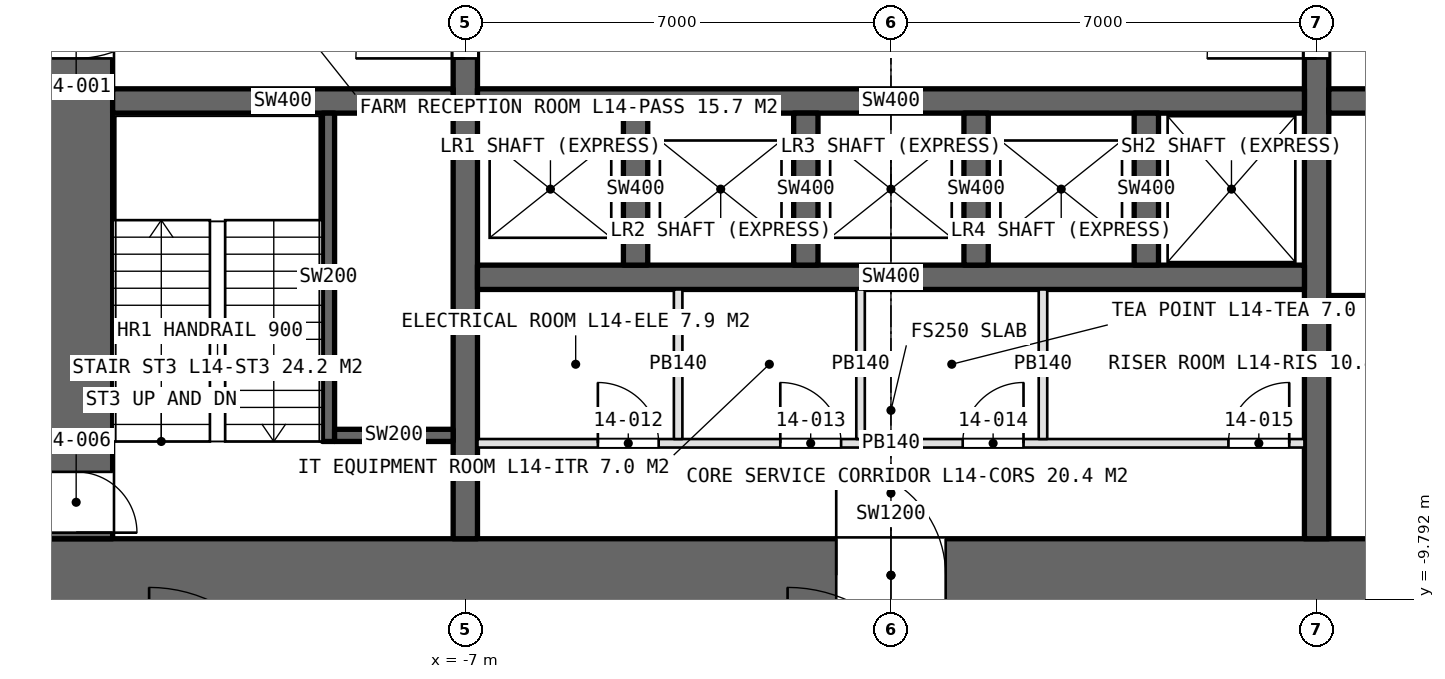
"""IFC4 building model, lengths in metres.
Left out: names, types, materials, properties, quantities, classifications, styles, units other than length and angle.
Written with IfcOpenShell. Run it as: python <this file> out.ifc"""

import sys

from ifc_helpers import new_model, si_unit, direction, frame, frame_2d, origin, place, context, subcontext, project, spatial, rectangle, extrude, element, fill, save


model = new_model("IFC4")
c1 = context("Model", 3, precision=1e-05, world=origin(), true_north=direction((0.0, 1.0)))
c2 = subcontext(c1, "Body", "Model", "MODEL_VIEW")
j1 = project(units=[si_unit("LENGTHUNIT", "METRE"), si_unit("PLANEANGLEUNIT", "RADIAN")], contexts=[c1])
p1 = place(None, origin())
s1 = spatial("IfcSite", under=j1, at=p1, CompositionType="ELEMENT")
p2 = place(p1, origin())
s2 = spatial("IfcBuilding", under=s1, at=p2, CompositionType="ELEMENT")
p3 = place(p2, frame((0.0, 0.0, 70.0)))
s3 = spatial("IfcBuildingStorey", under=s2, at=p3, CompositionType="ELEMENT", Elevation=70.0)
p4 = place(p3, frame((-14.0, -9.4, 0.0), z_axis=(0.0, 0.0, 1.0), x_axis=(1.0, 0.0, 0.0)))
e1 = element("IfcWall", 1, at=p4, inside=s3, PredefinedType="SHEAR", context=c2, shape_type="SweptSolid", body=[
    extrude(rectangle(XDim=28.0, YDim=1.2, at=frame_2d((14.0, 0.0))), origin(), (0.0, 0.0, 1.0), 5.0),
])
p5 = place(p4, frame((13.1, 0.0, 0.0)))
e2 = element("IfcOpeningElement", 2, at=p5, cuts=e1, PredefinedType="OPENING", context=c2, shape_type="SweptSolid", body=[
    extrude(rectangle(XDim=1.8, YDim=2.4, at=frame_2d((0.9, 1.2))), frame((0.0, 0.61, 0.0), z_axis=(0.0, -1.0, 0.0), x_axis=(1.0, 0.0, 0.0)), (0.0, 0.0, 1.0), 1.22),
])
p6 = place(p4, frame((22.9, 0.0, 0.0)))
e3 = element("IfcOpeningElement", 3, at=p6, cuts=e1, PredefinedType="OPENING", context=c2, shape_type="SweptSolid", body=[
    extrude(rectangle(XDim=2.2, YDim=2.7, at=frame_2d((1.1, 1.35))), frame((0.0, 0.61, 0.0), z_axis=(0.0, -1.0, 0.0), x_axis=(1.0, 0.0, 0.0)), (0.0, 0.0, 1.0), 1.22),
])
p7 = place(p3, frame((-13.4, 8.8, 0.0), z_axis=(0.0, 0.0, 1.0), x_axis=(0.0, -1.0, 0.0)))
e4 = element("IfcWall", 4, at=p7, inside=s3, PredefinedType="SHEAR", context=c2, shape_type="SweptSolid", body=[
    extrude(rectangle(XDim=17.6, YDim=1.2, at=frame_2d((8.8, 0.0))), origin(), (0.0, 0.0, 1.0), 5.0),
])
p8 = place(p7, frame((7.9, 0.0, 0.0)))
e5 = element("IfcOpeningElement", 5, at=p8, cuts=e4, PredefinedType="OPENING", context=c2, shape_type="SweptSolid", body=[
    extrude(rectangle(XDim=1.8, YDim=2.4, at=frame_2d((0.9, 1.2))), frame((0.0, 0.61, 0.0), z_axis=(0.0, -1.0, 0.0), x_axis=(1.0, 0.0, 0.0)), (0.0, 0.0, 1.0), 1.22),
])
p9 = place(p7, frame((16.5, 0.0, 0.0)))
e6 = element("IfcOpeningElement", 6, at=p9, cuts=e4, PredefinedType="OPENING", context=c2, shape_type="SweptSolid", body=[
    extrude(rectangle(XDim=1.0, YDim=2.4, at=frame_2d((0.5, 1.2))), frame((0.0, 0.61, 0.0), z_axis=(0.0, -1.0, 0.0), x_axis=(1.0, 0.0, 0.0)), (0.0, 0.0, 1.0), 1.22),
])
p10 = place(p3, frame((-7.0, -8.8, 0.0), z_axis=(0.0, 0.0, 1.0), x_axis=(0.0, 1.0, 0.0)))
e7 = element("IfcWall", 7, at=p10, inside=s3, PredefinedType="SHEAR", context=c2, shape_type="SweptSolid", body=[
    extrude(rectangle(XDim=17.6, YDim=0.4, at=frame_2d((8.8, 0.0))), origin(), (0.0, 0.0, 1.0), 5.0),
])
p11 = place(p10, frame((7.9, 0.0, 0.0)))
e8 = element("IfcOpeningElement", 8, at=p11, cuts=e7, PredefinedType="OPENING", context=c2, shape_type="SweptSolid", body=[
    extrude(rectangle(XDim=1.8, YDim=2.4, at=frame_2d((0.9, 1.2))), frame((0.0, 0.21, 0.0), z_axis=(0.0, -1.0, 0.0), x_axis=(1.0, 0.0, 0.0)), (0.0, 0.0, 1.0), 0.42),
])
p12 = place(p3, frame((7.0, -8.8, 0.0), z_axis=(0.0, 0.0, 1.0), x_axis=(0.0, 1.0, 0.0)))
e9 = element("IfcWall", 9, at=p12, inside=s3, PredefinedType="SHEAR", context=c2, shape_type="SweptSolid", body=[
    extrude(rectangle(XDim=17.6, YDim=0.4, at=frame_2d((8.8, 0.0))), origin(), (0.0, 0.0, 1.0), 5.0),
])
p13 = place(p12, frame((7.9, 0.0, 0.0)))
e10 = element("IfcOpeningElement", 10, at=p13, cuts=e9, PredefinedType="OPENING", context=c2, shape_type="SweptSolid", body=[
    extrude(rectangle(XDim=1.8, YDim=2.4, at=frame_2d((0.9, 1.2))), frame((0.0, 0.21, 0.0), z_axis=(0.0, -1.0, 0.0), x_axis=(1.0, 0.0, 0.0)), (0.0, 0.0, 1.0), 0.42),
])
for number, where, z_axis, x_axis in (
    (11, (-6.8, -1.6, 0.0), (0.0, 0.0, 1.0), (1.0, 0.0, 0.0)),
    (12, (-6.8, -4.5, 0.0), (0.0, 0.0, 1.0), (1.0, 0.0, 0.0)),
):
    element("IfcWall", number, at=place(p3, frame(where, z_axis=z_axis, x_axis=x_axis)), inside=s3, PredefinedType="SHEAR", context=c2, shape_type="SweptSolid", body=[
        extrude(rectangle(XDim=13.6, YDim=0.4, at=frame_2d((6.8, 0.0))), origin(), (0.0, 0.0, 1.0), 5.0),
    ])
p14 = place(p3, frame((-12.8, -1.6, 0.0), z_axis=(0.0, 0.0, 1.0), x_axis=(1.0, 0.0, 0.0)))
e13 = element("IfcWall", 13, at=p14, inside=s3, PredefinedType="SHEAR", context=c2, shape_type="SweptSolid", body=[
    extrude(rectangle(XDim=5.6, YDim=0.4, at=frame_2d((2.8, 0.0))), origin(), (0.0, 0.0, 1.0), 5.0),
])
p15 = place(p3, frame((7.2, -1.6, 0.0), z_axis=(0.0, 0.0, 1.0), x_axis=(1.0, 0.0, 0.0)))
e14 = element("IfcWall", 14, at=p15, inside=s3, PredefinedType="SHEAR", context=c2, shape_type="SweptSolid", body=[
    extrude(rectangle(XDim=5.6, YDim=0.4, at=frame_2d((2.8, 0.0))), origin(), (0.0, 0.0, 1.0), 5.0),
])
p16 = place(p15, frame((0.9, 0.0, 0.0)))
e15 = element("IfcOpeningElement", 15, at=p16, cuts=e14, PredefinedType="OPENING", context=c2, shape_type="SweptSolid", body=[
    extrude(rectangle(XDim=1.3, YDim=2.4, at=frame_2d((0.65, 1.2))), frame((0.0, 0.21, 0.0), z_axis=(0.0, -1.0, 0.0), x_axis=(1.0, 0.0, 0.0)), (0.0, 0.0, 1.0), 0.42),
])
p17 = place(p15, frame((3.9, 0.0, 0.0)))
e16 = element("IfcOpeningElement", 16, at=p17, cuts=e14, PredefinedType="OPENING", context=c2, shape_type="SweptSolid", body=[
    extrude(rectangle(XDim=1.3, YDim=2.4, at=frame_2d((0.65, 1.2))), frame((0.0, 0.21, 0.0), z_axis=(0.0, -1.0, 0.0), x_axis=(1.0, 0.0, 0.0)), (0.0, 0.0, 1.0), 0.42),
])
p18 = place(p3, frame((7.2, -5.0, 0.0), z_axis=(0.0, 0.0, 1.0), x_axis=(1.0, 0.0, 0.0)))
e17 = element("IfcWall", 17, at=p18, inside=s3, PredefinedType="SHEAR", context=c2, shape_type="SweptSolid", body=[
    extrude(rectangle(XDim=5.6, YDim=0.4, at=frame_2d((2.8, 0.0))), origin(), (0.0, 0.0, 1.0), 5.0),
])
for number, where, z_axis, x_axis in (
    (18, (-4.2, -4.3, 0.0), (0.0, 0.0, 1.0), (0.0, 1.0, 0.0)),
    (19, (-1.4, -4.3, 0.0), (0.0, 0.0, 1.0), (0.0, 1.0, 0.0)),
    (20, (1.4, -4.3, 0.0), (0.0, 0.0, 1.0), (0.0, 1.0, 0.0)),
    (21, (4.2, -4.3, 0.0), (0.0, 0.0, 1.0), (0.0, 1.0, 0.0)),
):
    element("IfcWall", number, at=place(p3, frame(where, z_axis=z_axis, x_axis=x_axis)), inside=s3, PredefinedType="SHEAR", context=c2, shape_type="SweptSolid", body=[
        extrude(rectangle(XDim=2.5, YDim=0.4, at=frame_2d((1.25, 0.0))), origin(), (0.0, 0.0, 1.0), 5.0),
    ])
p19 = place(p3, frame((-6.8, -7.23, 0.0), z_axis=(0.0, 0.0, 1.0), x_axis=(1.0, 0.0, 0.0)))
e22 = element("IfcWall", 22, at=p19, inside=s3, PredefinedType="PARTITIONING", context=c2, shape_type="SweptSolid", body=[
    extrude(rectangle(XDim=13.6, YDim=0.14, at=frame_2d((6.8, 0.0))), origin(), (0.0, 0.0, 1.0), 4.75),
])
p20 = place(p19, frame((1.98, 0.0, 0.0)))
e23 = element("IfcOpeningElement", 23, at=p20, cuts=e22, PredefinedType="OPENING", context=c2, shape_type="SweptSolid", body=[
    extrude(rectangle(XDim=1.0, YDim=2.4, at=frame_2d((0.5, 1.2))), frame((0.0, 0.08, 0.0), z_axis=(0.0, -1.0, 0.0), x_axis=(1.0, 0.0, 0.0)), (0.0, 0.0, 1.0), 0.16),
])
p21 = place(p19, frame((4.98, 0.0, 0.0)))
e24 = element("IfcOpeningElement", 24, at=p21, cuts=e22, PredefinedType="OPENING", context=c2, shape_type="SweptSolid", body=[
    extrude(rectangle(XDim=1.0, YDim=2.4, at=frame_2d((0.5, 1.2))), frame((0.0, 0.08, 0.0), z_axis=(0.0, -1.0, 0.0), x_axis=(1.0, 0.0, 0.0)), (0.0, 0.0, 1.0), 0.16),
])
p22 = place(p19, frame((7.98, 0.0, 0.0)))
e25 = element("IfcOpeningElement", 25, at=p22, cuts=e22, PredefinedType="OPENING", context=c2, shape_type="SweptSolid", body=[
    extrude(rectangle(XDim=1.0, YDim=2.4, at=frame_2d((0.5, 1.2))), frame((0.0, 0.08, 0.0), z_axis=(0.0, -1.0, 0.0), x_axis=(1.0, 0.0, 0.0)), (0.0, 0.0, 1.0), 0.16),
])
p23 = place(p19, frame((12.35, 0.0, 0.0)))
e26 = element("IfcOpeningElement", 26, at=p23, cuts=e22, PredefinedType="OPENING", context=c2, shape_type="SweptSolid", body=[
    extrude(rectangle(XDim=1.0, YDim=2.4, at=frame_2d((0.5, 1.2))), frame((0.0, 0.08, 0.0), z_axis=(0.0, -1.0, 0.0), x_axis=(1.0, 0.0, 0.0)), (0.0, 0.0, 1.0), 0.16),
])
for number, where, z_axis, x_axis in (
    (27, (-3.5, -4.7, 0.0), (0.0, 0.0, 1.0), (0.0, -1.0, 0.0)),
    (28, (-0.5, -4.7, 0.0), (0.0, 0.0, 1.0), (0.0, -1.0, 0.0)),
    (29, (2.5, -4.7, 0.0), (0.0, 0.0, 1.0), (0.0, -1.0, 0.0)),
):
    element("IfcWall", number, at=place(p3, frame(where, z_axis=z_axis, x_axis=x_axis)), inside=s3, PredefinedType="PARTITIONING", context=c2, shape_type="SweptSolid", body=[
        extrude(rectangle(XDim=2.46, YDim=0.14, at=frame_2d((1.23, 0.0))), origin(), (0.0, 0.0, 1.0), 4.75),
    ])
p24 = place(p3, frame((-9.25, -7.2, 0.0), z_axis=(0.0, 0.0, 1.0), x_axis=(0.0, 1.0, 0.0)))
e30 = element("IfcWall", 30, at=p24, inside=s3, PredefinedType="SOLIDWALL", context=c2, shape_type="SweptSolid", body=[
    extrude(rectangle(XDim=5.4, YDim=0.2, at=frame_2d((2.7, 0.0))), origin(), (0.0, 0.0, 1.0), 5.0),
])
p25 = place(p3, frame((-9.15, -7.1, 0.0), z_axis=(0.0, 0.0, 1.0), x_axis=(1.0, 0.0, 0.0)))
e31 = element("IfcWall", 31, at=p25, inside=s3, PredefinedType="SOLIDWALL", context=c2, shape_type="SweptSolid", body=[
    extrude(rectangle(XDim=1.95, YDim=0.2, at=frame_2d((0.975, 0.0))), origin(), (0.0, 0.0, 1.0), 5.0),
])
p26 = place(p8, origin())
e32 = element("IfcDoor", 32, at=p26, inside=s3, OperationType="DOUBLE_DOOR_SINGLE_SWING", PredefinedType="DOOR", context=c2, shape_type="SweptSolid", body=[
    extrude(rectangle(XDim=1.8, YDim=2.4, at=frame_2d((0.9, 1.2))), frame((0.0, 0.025, 0.0), z_axis=(0.0, -1.0, 0.0), x_axis=(1.0, 0.0, 0.0)), (0.0, 0.0, 1.0), 0.05),
])
fill(e5, e32)
p27 = place(p11, origin())
e33 = element("IfcDoor", 33, at=p27, inside=s3, OperationType="DOUBLE_DOOR_SINGLE_SWING", PredefinedType="DOOR", context=c2, shape_type="SweptSolid", body=[
    extrude(rectangle(XDim=1.8, YDim=2.4, at=frame_2d((0.9, 1.2))), frame((0.0, 0.025, 0.0), z_axis=(0.0, -1.0, 0.0), x_axis=(1.0, 0.0, 0.0)), (0.0, 0.0, 1.0), 0.05),
])
fill(e8, e33)
p28 = place(p13, origin())
e34 = element("IfcDoor", 34, at=p28, inside=s3, OperationType="DOUBLE_DOOR_SINGLE_SWING", PredefinedType="DOOR", context=c2, shape_type="SweptSolid", body=[
    extrude(rectangle(XDim=1.8, YDim=2.4, at=frame_2d((0.9, 1.2))), frame((0.0, 0.025, 0.0), z_axis=(0.0, -1.0, 0.0), x_axis=(1.0, 0.0, 0.0)), (0.0, 0.0, 1.0), 0.05),
])
fill(e10, e34)
p29 = place(p9, origin())
e35 = element("IfcDoor", 35, at=p29, inside=s3, OperationType="SINGLE_SWING_RIGHT", PredefinedType="DOOR", context=c2, shape_type="SweptSolid", body=[
    extrude(rectangle(XDim=1.0, YDim=2.4, at=frame_2d((0.5, 1.2))), frame((0.0, 0.025, 0.0), z_axis=(0.0, -1.0, 0.0), x_axis=(1.0, 0.0, 0.0)), (0.0, 0.0, 1.0), 0.05),
])
fill(e6, e35)
p30 = place(p20, origin())
e36 = element("IfcDoor", 36, at=p30, inside=s3, OperationType="SINGLE_SWING_LEFT", PredefinedType="DOOR", context=c2, shape_type="SweptSolid", body=[
    extrude(rectangle(XDim=1.0, YDim=2.4, at=frame_2d((0.5, 1.2))), frame((0.0, 0.025, 0.0), z_axis=(0.0, -1.0, 0.0), x_axis=(1.0, 0.0, 0.0)), (0.0, 0.0, 1.0), 0.05),
])
fill(e23, e36)
p31 = place(p21, origin())
e37 = element("IfcDoor", 37, at=p31, inside=s3, OperationType="SINGLE_SWING_LEFT", PredefinedType="DOOR", context=c2, shape_type="SweptSolid", body=[
    extrude(rectangle(XDim=1.0, YDim=2.4, at=frame_2d((0.5, 1.2))), frame((0.0, 0.025, 0.0), z_axis=(0.0, -1.0, 0.0), x_axis=(1.0, 0.0, 0.0)), (0.0, 0.0, 1.0), 0.05),
])
fill(e24, e37)
p32 = place(p22, origin())
e38 = element("IfcDoor", 38, at=p32, inside=s3, OperationType="SINGLE_SWING_RIGHT", PredefinedType="DOOR", context=c2, shape_type="SweptSolid", body=[
    extrude(rectangle(XDim=1.0, YDim=2.4, at=frame_2d((0.5, 1.2))), frame((0.0, 0.025, 0.0), z_axis=(0.0, -1.0, 0.0), x_axis=(1.0, 0.0, 0.0)), (0.0, 0.0, 1.0), 0.05),
])
fill(e25, e38)
p33 = place(p23, origin())
e39 = element("IfcDoor", 39, at=p33, inside=s3, OperationType="SINGLE_SWING_RIGHT", PredefinedType="DOOR", context=c2, shape_type="SweptSolid", body=[
    extrude(rectangle(XDim=1.0, YDim=2.4, at=frame_2d((0.5, 1.2))), frame((0.0, 0.025, 0.0), z_axis=(0.0, -1.0, 0.0), x_axis=(1.0, 0.0, 0.0)), (0.0, 0.0, 1.0), 0.05),
])
fill(e26, e39)
p34 = place(p5, origin())
e40 = element("IfcDoor", 40, at=p34, inside=s3, OperationType="DOUBLE_DOOR_SINGLE_SWING", PredefinedType="DOOR", context=c2, shape_type="SweptSolid", body=[
    extrude(rectangle(XDim=1.8, YDim=2.4, at=frame_2d((0.9, 1.2))), frame((0.0, 0.025, 0.0), z_axis=(0.0, -1.0, 0.0), x_axis=(1.0, 0.0, 0.0)), (0.0, 0.0, 1.0), 0.05),
])
fill(e2, e40)
save(model, sys.argv[1])
